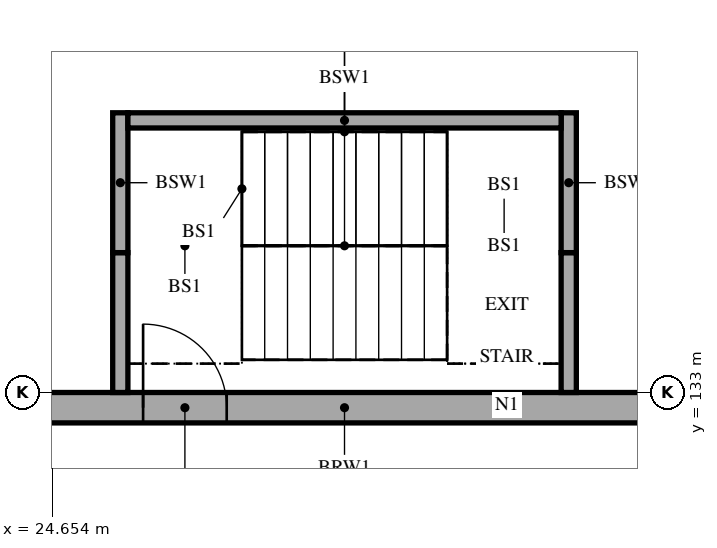
"""IFC4 building model, lengths in metres.
Left out: names, types, materials, properties, quantities, classifications, styles, units other than length and angle.
Written with IfcOpenShell. Run it as: python <this file> out.ifc"""

import sys

from ifc_helpers import new_model, si_unit, direction, frame, frame_2d, origin, place, context, subcontext, project, spatial, rectangle, extrude, element, fill, save


model = new_model("IFC4")
c1 = context("Model", 3, precision=1e-05, world=origin(), true_north=direction((0.0, 1.0)))
c2 = subcontext(c1, "Body", "Model", "MODEL_VIEW")
j1 = project(units=[si_unit("LENGTHUNIT", "METRE"), si_unit("PLANEANGLEUNIT", "RADIAN")], contexts=[c1])
p1 = place(None, origin())
s1 = spatial("IfcSite", under=j1, at=p1, CompositionType="ELEMENT")
p2 = place(p1, origin())
s2 = spatial("IfcBuilding", under=s1, at=p2, CompositionType="ELEMENT")
p3 = place(p2, frame((0.0, 0.0, -4.2)))
s3 = spatial("IfcBuildingStorey", under=s2, at=p3, CompositionType="ELEMENT", Elevation=-4.2)
p4 = place(p3, frame((24.4, 132.8, 0.0), z_axis=(0.0, 0.0, 1.0), x_axis=(1.0, 0.0, 0.0)))
e1 = element("IfcWall", 1, at=p4, inside=s3, PredefinedType="SOLIDWALL", context=c2, shape_type="SweptSolid", body=[
    extrude(rectangle(XDim=8.2, YDim=0.4, at=frame_2d((4.1, 0.0))), origin(), (0.0, 0.0, 1.0), 4.2),
])
p5 = place(p4, frame((1.45, 0.0, 0.0)))
e2 = element("IfcOpeningElement", 2, at=p5, cuts=e1, PredefinedType="OPENING", context=c2, shape_type="SweptSolid", body=[
    extrude(rectangle(XDim=1.1, YDim=2.1, at=frame_2d((0.55, 1.05))), frame((0.0, 0.21, 0.0), z_axis=(0.0, -1.0, 0.0), x_axis=(1.0, 0.0, 0.0)), (0.0, 0.0, 1.0), 0.42),
])
p6 = place(p3, frame((31.45, 133.0, 0.0), z_axis=(0.0, 0.0, 1.0), x_axis=(0.0, 1.0, 0.0)))
e3 = element("IfcWall", 3, at=p6, inside=s3, PredefinedType="SOLIDWALL", context=c2, shape_type="SweptSolid", body=[
    extrude(rectangle(XDim=1.84, YDim=0.2, at=frame_2d((0.92, 0.0))), origin(), (0.0, 0.0, 1.0), 4.2),
])
p7 = place(p3, frame((31.45, 134.84, 0.0), z_axis=(0.0, 0.0, 1.0), x_axis=(0.0, 1.0, 0.0)))
e4 = element("IfcWall", 4, at=p7, inside=s3, PredefinedType="SOLIDWALL", context=c2, shape_type="SweptSolid", body=[
    extrude(rectangle(XDim=1.84, YDim=0.2, at=frame_2d((0.92, 0.0))), origin(), (0.0, 0.0, 1.0), 4.2),
])
p8 = place(p3, frame((25.55, 133.0, 0.0), z_axis=(0.0, 0.0, 1.0), x_axis=(0.0, 1.0, 0.0)))
e5 = element("IfcWall", 5, at=p8, inside=s3, PredefinedType="SOLIDWALL", context=c2, shape_type="SweptSolid", body=[
    extrude(rectangle(XDim=1.84, YDim=0.2, at=frame_2d((0.92, 0.0))), origin(), (0.0, 0.0, 1.0), 4.2),
])
p9 = place(p3, frame((25.55, 134.84, 0.0), z_axis=(0.0, 0.0, 1.0), x_axis=(0.0, 1.0, 0.0)))
e6 = element("IfcWall", 6, at=p9, inside=s3, PredefinedType="SOLIDWALL", context=c2, shape_type="SweptSolid", body=[
    extrude(rectangle(XDim=1.84, YDim=0.2, at=frame_2d((0.92, 0.0))), origin(), (0.0, 0.0, 1.0), 4.2),
])
p10 = place(p3, frame((31.35, 136.58, 0.0), z_axis=(0.0, 0.0, 1.0), x_axis=(-1.0, 0.0, 0.0)))
e7 = element("IfcWall", 7, at=p10, inside=s3, PredefinedType="SOLIDWALL", context=c2, shape_type="SweptSolid", body=[
    extrude(rectangle(XDim=5.7, YDim=0.2, at=frame_2d((2.85, 0.0))), origin(), (0.0, 0.0, 1.0), 4.2),
])
p11 = place(p5, origin())
e8 = element("IfcDoor", 8, at=p11, inside=s3, OperationType="SINGLE_SWING_LEFT", PredefinedType="DOOR", context=c2, shape_type="SweptSolid", body=[
    extrude(rectangle(XDim=1.1, YDim=2.1, at=frame_2d((0.55, 1.05))), frame((0.0, 0.025, 0.0), z_axis=(0.0, -1.0, 0.0), x_axis=(1.0, 0.0, 0.0)), (0.0, 0.0, 1.0), 0.05),
])
fill(e2, e8)
save(model, sys.argv[1])
